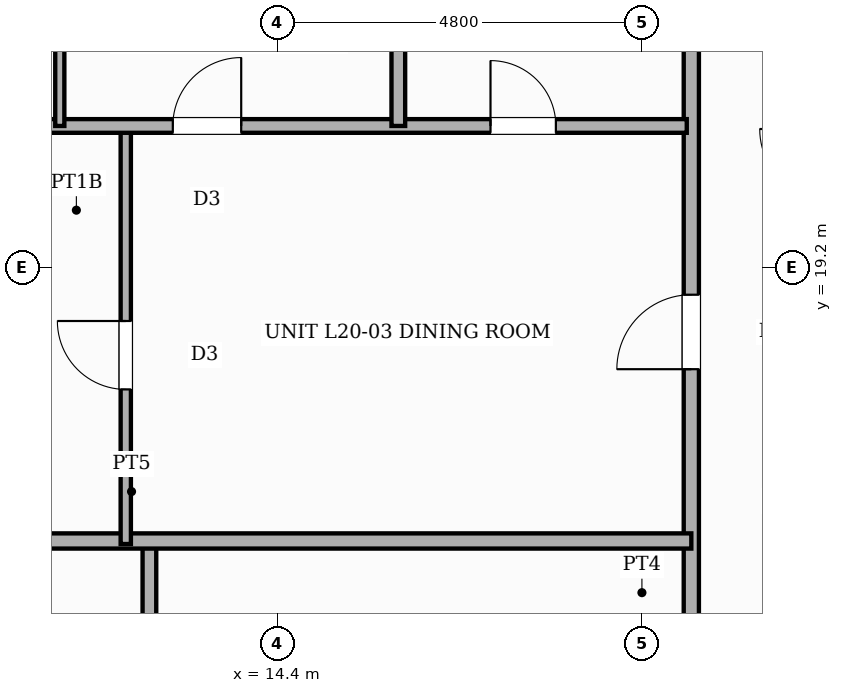
"""IFC4 building model, lengths in metres.
Left out: names, types, materials, properties, quantities, classifications, styles, units other than length and angle.
Written with IfcOpenShell. Run it as: python <this file> out.ifc"""

import sys

from ifc_helpers import new_model, si_unit, direction, frame, frame_2d, origin, place, context, subcontext, project, spatial, rectangle, extrude, element, fill, save


model = new_model("IFC4")
c1 = context("Model", 3, precision=1e-05, world=origin(), true_north=direction((0.0, 1.0)))
c2 = subcontext(c1, "Body", "Model", "MODEL_VIEW")
j1 = project(units=[si_unit("LENGTHUNIT", "METRE"), si_unit("PLANEANGLEUNIT", "RADIAN")], contexts=[c1])
p1 = place(None, origin())
s1 = spatial("IfcSite", under=j1, at=p1, CompositionType="ELEMENT")
p2 = place(p1, origin())
s2 = spatial("IfcBuilding", under=s1, at=p2, CompositionType="ELEMENT")
p3 = place(p2, frame((0.0, 0.0, 79.0)))
s3 = spatial("IfcBuildingStorey", under=s2, at=p3, CompositionType="ELEMENT", Elevation=79.0)
p4 = place(p3, frame((19.85, 5.12, 0.0), z_axis=(0.0, 0.0, 1.0), x_axis=(0.0, 1.0, 0.0)))
e1 = element("IfcWall", 1, at=p4, inside=s3, PredefinedType="PARTITIONING", context=c2, shape_type="SweptSolid", body=[
    extrude(rectangle(XDim=18.28, YDim=0.2, at=frame_2d((9.14, 0.0))), origin(), (0.0, 0.0, 1.0), 3.35),
])
p5 = place(p4, frame((1.001, 0.0, 0.0)))
e2 = element("IfcOpeningElement", 2, at=p5, cuts=e1, PredefinedType="OPENING", context=c2, shape_type="SweptSolid", body=[
    extrude(rectangle(XDim=0.98, YDim=2.18, at=frame_2d((0.49, 1.09))), frame((0.0, 0.11, 0.0), z_axis=(0.0, -1.0, 0.0), x_axis=(1.0, 0.0, 0.0)), (0.0, 0.0, 1.0), 0.22),
])
p6 = place(p4, frame((5.88, 0.0, 0.0)))
e3 = element("IfcOpeningElement", 3, at=p6, cuts=e1, PredefinedType="OPENING", context=c2, shape_type="SweptSolid", body=[
    extrude(rectangle(XDim=0.98, YDim=2.18, at=frame_2d((0.49, 1.09))), frame((0.0, 0.11, 0.0), z_axis=(0.0, -1.0, 0.0), x_axis=(1.0, 0.0, 0.0)), (0.0, 0.0, 1.0), 0.22),
])
p7 = place(p4, frame((12.74, 0.0, 0.0)))
e4 = element("IfcOpeningElement", 4, at=p7, cuts=e1, PredefinedType="OPENING", context=c2, shape_type="SweptSolid", body=[
    extrude(rectangle(XDim=0.98, YDim=2.18, at=frame_2d((0.49, 1.09))), frame((0.0, 0.11, 0.0), z_axis=(0.0, -1.0, 0.0), x_axis=(1.0, 0.0, 0.0)), (0.0, 0.0, 1.0), 0.22),
])
p8 = place(p3, frame((12.72, 12.54, 0.0), z_axis=(0.0, 0.0, 1.0), x_axis=(0.0, 1.0, 0.0)))
e5 = element("IfcWall", 5, at=p8, inside=s3, PredefinedType="PLUMBINGWALL", context=c2, shape_type="SweptSolid", body=[
    extrude(rectangle(XDim=3.1, YDim=0.18, at=frame_2d((1.55, 0.0))), origin(), (0.0, 0.0, 1.0), 3.35),
])
p9 = place(p3, frame((5.12, 15.6, 0.0), z_axis=(0.0, 0.0, 1.0), x_axis=(1.0, 0.0, 0.0)))
e6 = element("IfcWall", 6, at=p9, inside=s3, PredefinedType="SOLIDWALL", context=c2, shape_type="SweptSolid", body=[
    extrude(rectangle(XDim=14.73, YDim=0.2, at=frame_2d((7.365, 0.0))), origin(), (0.0, 0.0, 1.0), 3.35),
])
p10 = place(p3, frame((12.409, 15.56, 0.0), z_axis=(0.0, 0.0, 1.0), x_axis=(0.0, 1.0, 0.0)))
e7 = element("IfcWall", 7, at=p10, inside=s3, PredefinedType="PARTITIONING", context=c2, shape_type="SweptSolid", body=[
    extrude(rectangle(XDim=5.5, YDim=0.135, at=frame_2d((2.75, 0.0))), origin(), (0.0, 0.0, 1.0), 3.35),
])
p11 = place(p10, frame((2.034, 0.0, 0.0)))
e8 = element("IfcOpeningElement", 8, at=p11, cuts=e7, PredefinedType="OPENING", context=c2, shape_type="SweptSolid", body=[
    extrude(rectangle(XDim=0.9, YDim=2.15, at=frame_2d((0.45, 1.075))), frame((0.0, 0.078, 0.0), z_axis=(0.0, -1.0, 0.0), x_axis=(1.0, 0.0, 0.0)), (0.0, 0.0, 1.0), 0.155),
])
p12 = place(p3, frame((5.12, 21.06, 0.0), z_axis=(0.0, 0.0, 1.0), x_axis=(1.0, 0.0, 0.0)))
e9 = element("IfcWall", 9, at=p12, inside=s3, PredefinedType="PLUMBINGWALL", context=c2, shape_type="SweptSolid", body=[
    extrude(rectangle(XDim=14.67, YDim=0.18, at=frame_2d((7.335, 0.0))), origin(), (0.0, 0.0, 1.0), 3.35),
])
p13 = place(p12, frame((2.284, 0.0, 0.0)))
e10 = element("IfcOpeningElement", 10, at=p13, cuts=e9, PredefinedType="OPENING", context=c2, shape_type="SweptSolid", body=[
    extrude(rectangle(XDim=0.9, YDim=2.15, at=frame_2d((0.45, 1.075))), frame((0.0, 0.1, 0.0), z_axis=(0.0, -1.0, 0.0), x_axis=(1.0, 0.0, 0.0)), (0.0, 0.0, 1.0), 0.2),
])
p14 = place(p12, frame((7.908, 0.0, 0.0)))
e11 = element("IfcOpeningElement", 11, at=p14, cuts=e9, PredefinedType="OPENING", context=c2, shape_type="SweptSolid", body=[
    extrude(rectangle(XDim=0.9, YDim=2.15, at=frame_2d((0.45, 1.075))), frame((0.0, 0.1, 0.0), z_axis=(0.0, -1.0, 0.0), x_axis=(1.0, 0.0, 0.0)), (0.0, 0.0, 1.0), 0.2),
])
p15 = place(p12, frame((12.088, 0.0, 0.0)))
e12 = element("IfcOpeningElement", 12, at=p15, cuts=e9, PredefinedType="OPENING", context=c2, shape_type="SweptSolid", body=[
    extrude(rectangle(XDim=0.86, YDim=2.1, at=frame_2d((0.43, 1.05))), frame((0.0, 0.1, 0.0), z_axis=(0.0, -1.0, 0.0), x_axis=(1.0, 0.0, 0.0)), (0.0, 0.0, 1.0), 0.2),
])
p16 = place(p3, frame((11.541, 21.06, 0.0), z_axis=(0.0, 0.0, 1.0), x_axis=(0.0, 1.0, 0.0)))
e13 = element("IfcWall", 13, at=p16, inside=s3, PredefinedType="PARTITIONING", context=c2, shape_type="SweptSolid", body=[
    extrude(rectangle(XDim=2.28, YDim=0.12, at=frame_2d((1.14, 0.0))), origin(), (0.0, 0.0, 1.0), 3.35),
])
p17 = place(p3, frame((15.995, 21.06, 0.0), z_axis=(0.0, 0.0, 1.0), x_axis=(0.0, 1.0, 0.0)))
e14 = element("IfcWall", 14, at=p17, inside=s3, PredefinedType="PLUMBINGWALL", context=c2, shape_type="SweptSolid", body=[
    extrude(rectangle(XDim=2.28, YDim=0.18, at=frame_2d((1.14, 0.0))), origin(), (0.0, 0.0, 1.0), 3.35),
])
p18 = place(p7, origin())
e15 = element("IfcDoor", 15, at=p18, inside=s3, OperationType="SINGLE_SWING_LEFT", PredefinedType="DOOR", context=c2, shape_type="SweptSolid", body=[
    extrude(rectangle(XDim=0.98, YDim=2.18, at=frame_2d((0.49, 1.09))), frame((0.0, 0.025, 0.0), z_axis=(0.0, -1.0, 0.0), x_axis=(1.0, 0.0, 0.0)), (0.0, 0.0, 1.0), 0.05),
])
fill(e4, e15)
p19 = place(p11, origin())
e16 = element("IfcDoor", 16, at=p19, inside=s3, OperationType="SINGLE_SWING_RIGHT", PredefinedType="DOOR", context=c2, shape_type="SweptSolid", body=[
    extrude(rectangle(XDim=0.9, YDim=2.15, at=frame_2d((0.45, 1.075))), frame((0.0, 0.025, 0.0), z_axis=(0.0, -1.0, 0.0), x_axis=(1.0, 0.0, 0.0)), (0.0, 0.0, 1.0), 0.05),
])
fill(e8, e16)
p20 = place(p14, origin())
e17 = element("IfcDoor", 17, at=p20, inside=s3, OperationType="SINGLE_SWING_RIGHT", PredefinedType="DOOR", context=c2, shape_type="SweptSolid", body=[
    extrude(rectangle(XDim=0.9, YDim=2.15, at=frame_2d((0.45, 1.075))), frame((0.0, 0.025, 0.0), z_axis=(0.0, -1.0, 0.0), x_axis=(1.0, 0.0, 0.0)), (0.0, 0.0, 1.0), 0.05),
])
fill(e11, e17)
p21 = place(p15, origin())
e18 = element("IfcDoor", 18, at=p21, inside=s3, OperationType="SINGLE_SWING_LEFT", PredefinedType="DOOR", context=c2, shape_type="SweptSolid", body=[
    extrude(rectangle(XDim=0.86, YDim=2.1, at=frame_2d((0.43, 1.05))), frame((0.0, 0.025, 0.0), z_axis=(0.0, -1.0, 0.0), x_axis=(1.0, 0.0, 0.0)), (0.0, 0.0, 1.0), 0.05),
])
fill(e12, e18)
save(model, sys.argv[1])
